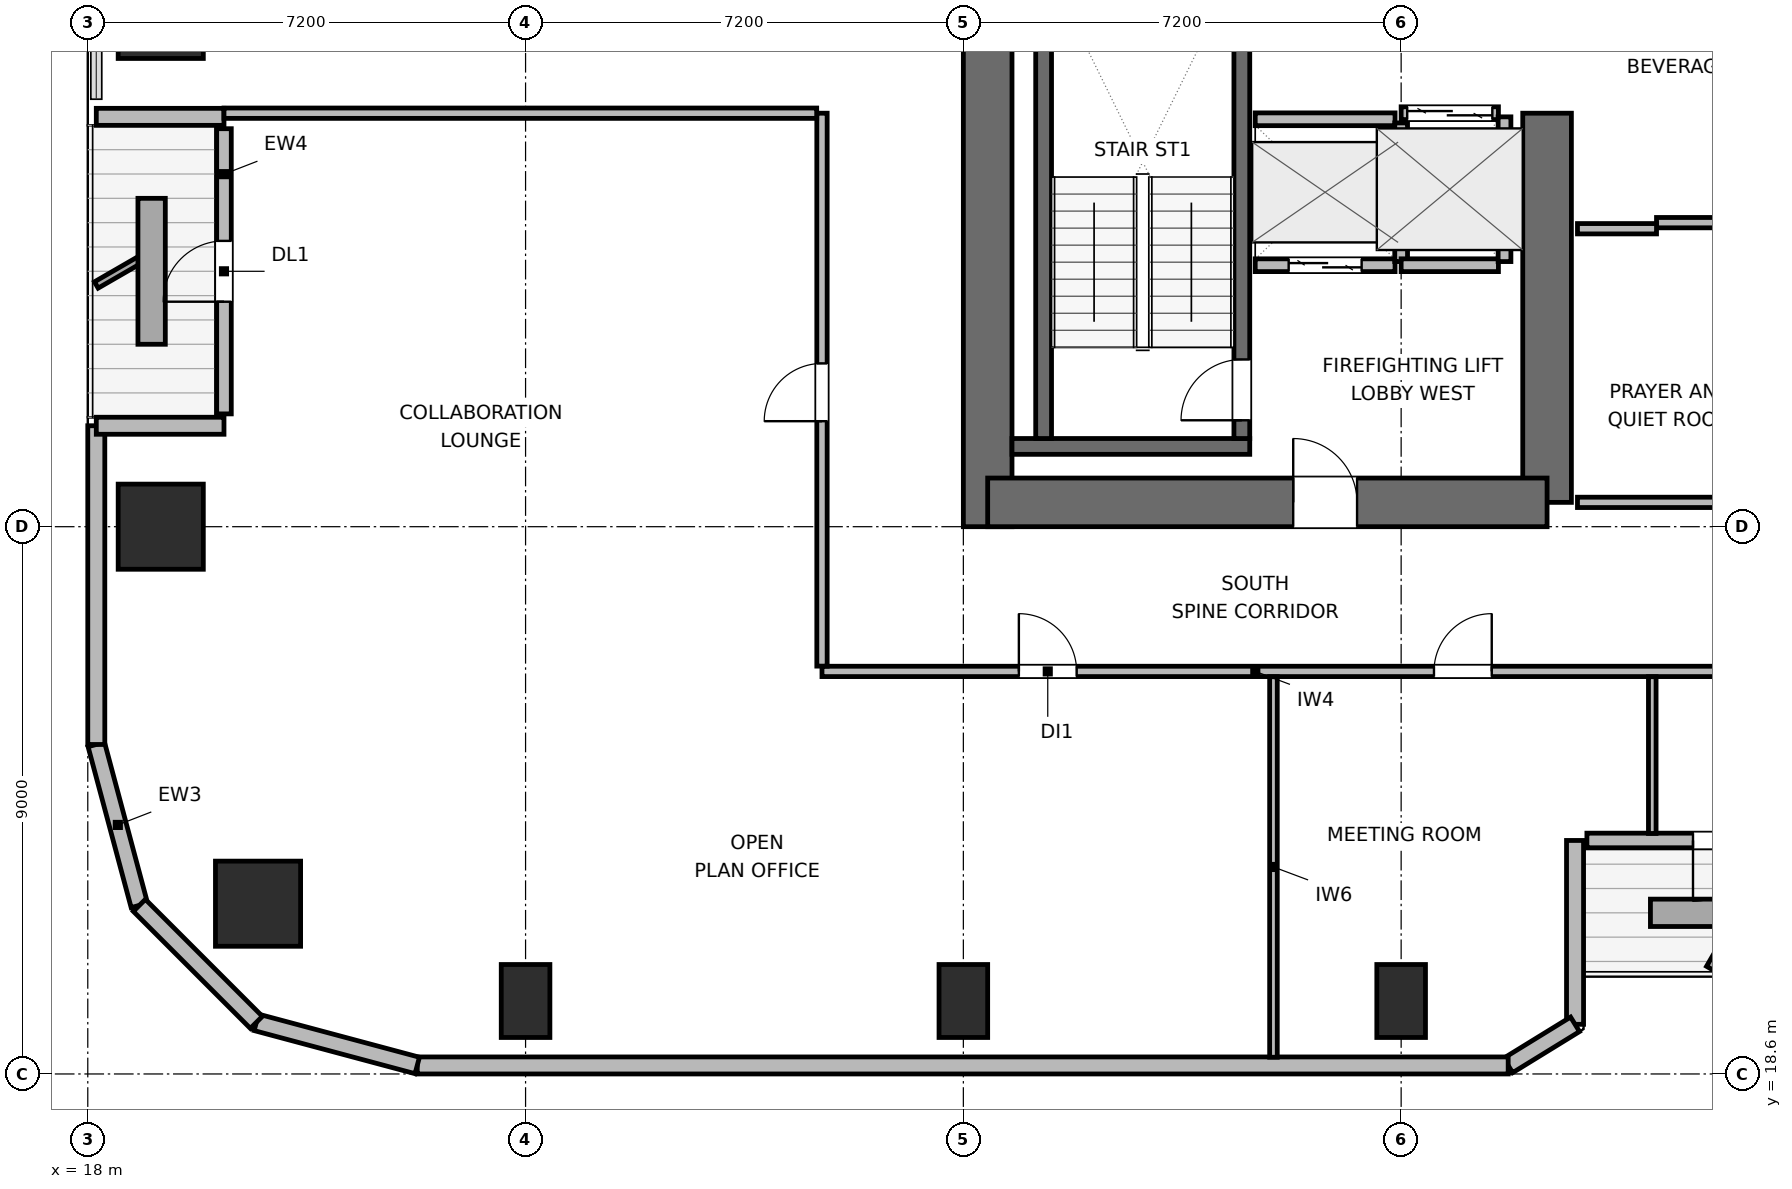
"""IFC4 building model, lengths in metres.
Left out: names, types, materials, properties, quantities, classifications, styles, units other than length and angle.
Written with IfcOpenShell. Run it as: python <this file> out.ifc"""

import sys

from ifc_helpers import new_model, si_unit, direction, frame, frame_2d, origin, origin_2d, place, context, subcontext, project, spatial, rectangle, circle, extrude, element, fill, save


model = new_model("IFC4")
c1 = context("Model", 3, precision=1e-05, world=origin(), true_north=direction((0.0, 1.0)))
c2 = subcontext(c1, "Body", "Model", "MODEL_VIEW")
j1 = project(units=[si_unit("LENGTHUNIT", "METRE"), si_unit("PLANEANGLEUNIT", "RADIAN")], contexts=[c1])
p1 = place(None, origin())
s1 = spatial("IfcSite", under=j1, at=p1, CompositionType="ELEMENT")
p2 = place(p1, origin())
s2 = spatial("IfcBuilding", under=s1, at=p2, CompositionType="ELEMENT")
p3 = place(p2, frame((0.0, 0.0, 154.5)))
s3 = spatial("IfcBuildingStorey", under=s2, at=p3, CompositionType="ELEMENT", Elevation=154.5)
p4 = place(p3, frame((32.8, 27.6, 0.0), z_axis=(0.0, 0.0, 1.0), x_axis=(0.0, 1.0, 0.0)))
e1 = element("IfcWall", 1, at=p4, inside=s3, PredefinedType="SHEAR", context=c2, shape_type="SweptSolid", body=[
    extrude(rectangle(XDim=16.8, YDim=0.8, at=frame_2d((8.4, 0.0))), origin(), (0.0, 0.0, 1.0), 3.9),
])
p5 = place(p3, frame((42.0, 28.0, 0.0), z_axis=(0.0, 0.0, 1.0), x_axis=(0.0, 1.0, 0.0)))
e2 = element("IfcWall", 2, at=p5, inside=s3, PredefinedType="SHEAR", context=c2, shape_type="SweptSolid", body=[
    extrude(rectangle(XDim=6.4, YDim=0.8, at=frame_2d((3.2, 0.0))), origin(), (0.0, 0.0, 1.0), 3.9),
])
p6 = place(p3, frame((32.8, 28.0, 0.0), z_axis=(0.0, 0.0, 1.0), x_axis=(1.0, 0.0, 0.0)))
e3 = element("IfcWall", 3, at=p6, inside=s3, PredefinedType="SHEAR", context=c2, shape_type="SweptSolid", body=[
    extrude(rectangle(XDim=9.2, YDim=0.8, at=frame_2d((4.6, 0.0))), origin(), (0.0, 0.0, 1.0), 3.9),
])
p7 = place(p6, frame((5.025, 0.0, 0.0)))
e4 = element("IfcOpeningElement", 4, at=p7, cuts=e3, PredefinedType="OPENING", context=c2, shape_type="SweptSolid", body=[
    extrude(rectangle(XDim=1.05, YDim=2.04, at=frame_2d((0.525, 1.02))), frame((0.0, 0.41, 0.0), z_axis=(0.0, -1.0, 0.0), x_axis=(1.0, 0.0, 0.0)), (0.0, 0.0, 1.0), 0.82),
])
p8 = place(p3, frame((33.2, 28.92, 0.0), z_axis=(0.0, 0.0, 1.0), x_axis=(1.0, 0.0, 0.0)))
e5 = element("IfcWall", 5, at=p8, inside=s3, PredefinedType="SHEAR", context=c2, shape_type="SweptSolid", body=[
    extrude(rectangle(XDim=3.91, YDim=0.26, at=frame_2d((1.955, 0.0))), origin(), (0.0, 0.0, 1.0), 3.9),
])
p9 = place(p3, frame((33.72, 29.05, 0.0), z_axis=(0.0, 0.0, 1.0), x_axis=(0.0, 1.0, 0.0)))
e6 = element("IfcWall", 6, at=p9, inside=s3, PredefinedType="SHEAR", context=c2, shape_type="SweptSolid", body=[
    extrude(rectangle(XDim=7.6, YDim=0.26, at=frame_2d((3.8, 0.0))), origin(), (0.0, 0.0, 1.0), 3.9),
])
p10 = place(p3, frame((36.98, 29.05, 0.0), z_axis=(0.0, 0.0, 1.0), x_axis=(0.0, 1.0, 0.0)))
e7 = element("IfcWall", 7, at=p10, inside=s3, PredefinedType="SHEAR", context=c2, shape_type="SweptSolid", body=[
    extrude(rectangle(XDim=7.6, YDim=0.26, at=frame_2d((3.8, 0.0))), origin(), (0.0, 0.0, 1.0), 3.9),
])
p11 = place(p10, frame((0.3, 0.0, 0.0)))
e8 = element("IfcOpeningElement", 8, at=p11, cuts=e7, PredefinedType="OPENING", context=c2, shape_type="SweptSolid", body=[
    extrude(rectangle(XDim=1.0, YDim=2.04, at=frame_2d((0.5, 1.02))), frame((0.0, 0.14, 0.0), z_axis=(0.0, -1.0, 0.0), x_axis=(1.0, 0.0, 0.0)), (0.0, 0.0, 1.0), 0.28),
])
p12 = place(p3, frame((20.8, 21.4, 0.0), z_axis=(0.0, 0.0, 1.0), x_axis=(1.0, 0.0, 0.0)))
e9 = element("IfcColumn", 9, at=p12, inside=s3, PredefinedType="COLUMN", context=c2, shape_type="SweptSolid", body=[
    extrude(circle(Radius=0.7, at=origin_2d()), origin(), (0.0, 0.0, 1.0), 3.9),
])
for number, where, z_axis, x_axis in (
    (10, (25.2, 19.8, 0.0), (0.0, 0.0, 1.0), (1.0, 0.0, 0.0)),
    (11, (32.4, 19.8, 0.0), (0.0, 0.0, 1.0), (1.0, 0.0, 0.0)),
    (12, (39.6, 19.8, 0.0), (0.0, 0.0, 1.0), (1.0, 0.0, 0.0)),
):
    element("IfcColumn", number, at=place(p3, frame(where, z_axis=z_axis, x_axis=x_axis)), inside=s3, PredefinedType="COLUMN", context=c2, shape_type="SweptSolid", body=[
        extrude(rectangle(XDim=0.8, YDim=1.2, at=origin_2d()), origin(), (0.0, 0.0, 1.0), 3.9),
    ])
for number, where, z_axis, x_axis in (
    (13, (19.2, 27.6, 0.0), (0.0, 0.0, 1.0), (1.0, 0.0, 0.0)),
    (14, (19.2, 36.0, 0.0), (0.0, 0.0, 1.0), (1.0, 0.0, 0.0)),
):
    element("IfcColumn", number, at=place(p3, frame(where, z_axis=z_axis, x_axis=x_axis)), inside=s3, PredefinedType="COLUMN", context=c2, shape_type="SweptSolid", body=[
        extrude(rectangle(XDim=1.4, YDim=1.4, at=origin_2d()), origin(), (0.0, 0.0, 1.0), 3.9),
    ])
p13 = place(p3, frame((18.848, 21.373, 0.0), z_axis=(0.0, 0.0, 1.0), x_axis=(-0.258672222976, 0.9659651552, 0.0)))
e15 = element("IfcWall", 15, at=p13, inside=s3, PredefinedType="SOLIDWALL", context=c2, shape_type="SweptSolid", body=[
    extrude(rectangle(XDim=2.739, YDim=0.28, at=frame_2d((1.37, 0.0))), origin(), (0.0, 0.0, 1.0), 3.68),
])
p14 = place(p3, frame((18.14, 24.018, 0.0), z_axis=(0.0, 0.0, 1.0), x_axis=(0.0, 1.0, 0.0)))
e16 = element("IfcWall", 16, at=p14, inside=s3, PredefinedType="SOLIDWALL", context=c2, shape_type="SweptSolid", body=[
    extrude(rectangle(XDim=5.242, YDim=0.28, at=frame_2d((2.621, 0.0))), origin(), (0.0, 0.0, 1.0), 3.68),
])
p15 = place(p3, frame((18.14, 29.26, 0.0), z_axis=(0.0, 0.0, 1.0), x_axis=(1.0, 0.0, 0.0)))
e17 = element("IfcWall", 17, at=p15, inside=s3, PredefinedType="SOLIDWALL", context=c2, shape_type="SweptSolid", body=[
    extrude(rectangle(XDim=2.1, YDim=0.28, at=frame_2d((1.05, 0.0))), origin(), (0.0, 0.0, 1.0), 3.116),
])
p16 = place(p3, frame((20.24, 29.455, 0.0), z_axis=(0.0, 0.0, 1.0), x_axis=(0.0, 1.0, 0.0)))
e18 = element("IfcWall", 18, at=p16, inside=s3, PredefinedType="SOLIDWALL", context=c2, shape_type="SweptSolid", body=[
    extrude(rectangle(XDim=4.69, YDim=0.24, at=frame_2d((2.345, 0.0))), origin(), (0.0, 0.0, 1.0), 3.248),
])
p17 = place(p16, frame((1.845, 0.0, 0.0)))
e19 = element("IfcOpeningElement", 19, at=p17, cuts=e18, PredefinedType="OPENING", context=c2, shape_type="SweptSolid", body=[
    extrude(rectangle(XDim=1.0, YDim=2.02, at=frame_2d((0.5, 1.01))), frame((0.0, 0.13, 0.0), z_axis=(0.0, -1.0, 0.0), x_axis=(1.0, 0.0, 0.0)), (0.0, 0.0, 1.0), 0.26),
])
p18 = place(p3, frame((20.24, 34.34, 0.0), z_axis=(0.0, 0.0, 1.0), x_axis=(-1.0, 0.0, 0.0)))
e20 = element("IfcWall", 20, at=p18, inside=s3, PredefinedType="SOLIDWALL", context=c2, shape_type="SweptSolid", body=[
    extrude(rectangle(XDim=2.1, YDim=0.28, at=frame_2d((1.05, 0.0))), origin(), (0.0, 0.0, 1.0), 3.116),
])
p19 = place(p3, frame((47.145, 22.44, 0.0), z_axis=(0.0, 0.0, 1.0), x_axis=(-1.0, 0.0, 0.0)))
e21 = element("IfcWall", 21, at=p19, inside=s3, PredefinedType="SOLIDWALL", context=c2, shape_type="SweptSolid", body=[
    extrude(rectangle(XDim=4.49, YDim=0.24, at=frame_2d((2.245, 0.0))), origin(), (0.0, 0.0, 1.0), 3.68),
])
p20 = place(p19, frame((1.745, 0.0, 0.0)))
e22 = element("IfcOpeningElement", 22, at=p20, cuts=e21, PredefinedType="OPENING", context=c2, shape_type="SweptSolid", body=[
    extrude(rectangle(XDim=1.0, YDim=2.02, at=frame_2d((0.5, 1.01))), frame((0.0, 0.13, 0.0), z_axis=(0.0, -1.0, 0.0), x_axis=(1.0, 0.0, 0.0)), (0.0, 0.0, 1.0), 0.26),
])
p21 = place(p3, frame((42.46, 22.44, 0.0), z_axis=(0.0, 0.0, 1.0), x_axis=(0.0, -1.0, 0.0)))
e23 = element("IfcWall", 23, at=p21, inside=s3, PredefinedType="SOLIDWALL", context=c2, shape_type="SweptSolid", body=[
    extrude(rectangle(XDim=3.024, YDim=0.28, at=frame_2d((1.512, 0.0))), origin(), (0.0, 0.0, 1.0), 2.265),
])
p22 = place(p3, frame((42.46, 19.416, 0.0), z_axis=(0.0, 0.0, 1.0), x_axis=(-0.851801140441, -0.523865266212, 0.0)))
e24 = element("IfcWall", 24, at=p22, inside=s3, PredefinedType="SOLIDWALL", context=c2, shape_type="SweptSolid", body=[
    extrude(rectangle(XDim=1.291, YDim=0.28, at=frame_2d((0.646, 0.0))), origin(), (0.0, 0.0, 1.0), 3.68),
])
p23 = place(p3, frame((41.36, 18.74, 0.0), z_axis=(0.0, 0.0, 1.0), x_axis=(-1.0, 0.0, 0.0)))
e25 = element("IfcWall", 25, at=p23, inside=s3, PredefinedType="SOLIDWALL", context=c2, shape_type="SweptSolid", body=[
    extrude(rectangle(XDim=17.942, YDim=0.28, at=frame_2d((8.971, 0.0))), origin(), (0.0, 0.0, 1.0), 3.68),
])
p24 = place(p3, frame((23.418, 18.74, 0.0), z_axis=(0.0, 0.0, 1.0), x_axis=(-0.965971118627, 0.258649952598, 0.0)))
e26 = element("IfcWall", 26, at=p24, inside=s3, PredefinedType="SOLIDWALL", context=c2, shape_type="SweptSolid", body=[
    extrude(rectangle(XDim=2.739, YDim=0.28, at=frame_2d((1.37, 0.0))), origin(), (0.0, 0.0, 1.0), 3.68),
])
p25 = place(p3, frame((20.772, 19.448, 0.0), z_axis=(0.0, 0.0, 1.0), x_axis=(-0.707106781187, 0.707106781187, 0.0)))
e27 = element("IfcWall", 27, at=p25, inside=s3, PredefinedType="SOLIDWALL", context=c2, shape_type="SweptSolid", body=[
    extrude(rectangle(XDim=2.721, YDim=0.28, at=frame_2d((1.36, 0.0))), origin(), (0.0, 0.0, 1.0), 3.68),
])
p26 = place(p3, frame((37.2, 31.9, 0.0), z_axis=(0.0, 0.0, 1.0), x_axis=(1.0, 0.0, 0.0)))
e28 = element("IfcWall", 28, at=p26, inside=s3, PredefinedType="PARTITIONING", context=c2, shape_type="SweptSolid", body=[
    extrude(rectangle(XDim=2.3, YDim=0.21, at=frame_2d((1.15, 0.0))), origin(), (0.0, 0.0, 1.0), 3.68),
])
p27 = place(p26, frame((0.55, 0.0, 0.0)))
e29 = element("IfcOpeningElement", 29, at=p27, cuts=e28, PredefinedType="OPENING", context=c2, shape_type="SweptSolid", body=[
    extrude(rectangle(XDim=1.2, YDim=2.04, at=frame_2d((0.6, 1.02))), frame((0.0, 0.115, 0.0), z_axis=(0.0, -1.0, 0.0), x_axis=(1.0, 0.0, 0.0)), (0.0, 0.0, 1.0), 0.23),
])
p28 = place(p3, frame((37.2, 34.3, 0.0), z_axis=(0.0, 0.0, 1.0), x_axis=(1.0, 0.0, 0.0)))
e30 = element("IfcWall", 30, at=p28, inside=s3, PredefinedType="PARTITIONING", context=c2, shape_type="SweptSolid", body=[
    extrude(rectangle(XDim=2.3, YDim=0.21, at=frame_2d((1.15, 0.0))), origin(), (0.0, 0.0, 1.0), 3.68),
])
p29 = place(p3, frame((39.6, 31.96, 0.0), z_axis=(0.0, 0.0, 1.0), x_axis=(0.0, 1.0, 0.0)))
e31 = element("IfcWall", 31, at=p29, inside=s3, PredefinedType="PARTITIONING", context=c2, shape_type="SweptSolid", body=[
    extrude(rectangle(XDim=2.28, YDim=0.21, at=frame_2d((1.14, 0.0))), origin(), (0.0, 0.0, 1.0), 3.68),
])
p30 = place(p3, frame((39.6, 34.4, 0.0), z_axis=(0.0, 0.0, 1.0), x_axis=(1.0, 0.0, 0.0)))
e32 = element("IfcWall", 32, at=p30, inside=s3, PredefinedType="PARTITIONING", context=c2, shape_type="SweptSolid", body=[
    extrude(rectangle(XDim=1.6, YDim=0.21, at=frame_2d((0.8, 0.0))), origin(), (0.0, 0.0, 1.0), 3.68),
])
p31 = place(p30, frame((0.1, 0.0, 0.0)))
e33 = element("IfcOpeningElement", 33, at=p31, cuts=e32, PredefinedType="OPENING", context=c2, shape_type="SweptSolid", body=[
    extrude(rectangle(XDim=1.4, YDim=2.06, at=frame_2d((0.7, 1.03))), frame((0.0, 0.115, 0.0), z_axis=(0.0, -1.0, 0.0), x_axis=(1.0, 0.0, 0.0)), (0.0, 0.0, 1.0), 0.23),
])
p32 = place(p3, frame((39.6, 31.9, 0.0), z_axis=(0.0, 0.0, 1.0), x_axis=(1.0, 0.0, 0.0)))
e34 = element("IfcWall", 34, at=p32, inside=s3, PredefinedType="PARTITIONING", context=c2, shape_type="SweptSolid", body=[
    extrude(rectangle(XDim=1.6, YDim=0.21, at=frame_2d((0.8, 0.0))), origin(), (0.0, 0.0, 1.0), 3.68),
])
p33 = place(p3, frame((41.3, 31.96, 0.0), z_axis=(0.0, 0.0, 1.0), x_axis=(0.0, 1.0, 0.0)))
e35 = element("IfcWall", 35, at=p33, inside=s3, PredefinedType="PARTITIONING", context=c2, shape_type="SweptSolid", body=[
    extrude(rectangle(XDim=2.38, YDim=0.21, at=frame_2d((1.19, 0.0))), origin(), (0.0, 0.0, 1.0), 3.68),
])
p34 = place(p3, frame((43.8, 32.6, 0.0), z_axis=(0.0, 0.0, 1.0), x_axis=(1.0, 0.0, 0.0)))
e36 = element("IfcWall", 36, at=p34, inside=s3, PredefinedType="PARTITIONING", context=c2, shape_type="SweptSolid", body=[
    extrude(rectangle(XDim=2.913, YDim=0.17, at=frame_2d((1.457, 0.0))), origin(), (0.0, 0.0, 1.0), 3.68),
])
p35 = place(p3, frame((42.5, 28.0, 0.0), z_axis=(0.0, 0.0, 1.0), x_axis=(1.0, 0.0, 0.0)))
e37 = element("IfcWall", 37, at=p35, inside=s3, PredefinedType="PARTITIONING", context=c2, shape_type="SweptSolid", body=[
    extrude(rectangle(XDim=4.213, YDim=0.17, at=frame_2d((2.106, 0.0))), origin(), (0.0, 0.0, 1.0), 2.565),
])
p36 = place(p3, frame((42.5, 32.5, 0.0), z_axis=(0.0, 0.0, 1.0), x_axis=(1.0, 0.0, 0.0)))
e38 = element("IfcWall", 38, at=p36, inside=s3, PredefinedType="PARTITIONING", context=c2, shape_type="SweptSolid", body=[
    extrude(rectangle(XDim=1.3, YDim=0.17, at=frame_2d((0.65, 0.0))), origin(), (0.0, 0.0, 1.0), 3.68),
])
p37 = place(p3, frame((30.075, 25.22, 0.0), z_axis=(0.0, 0.0, 1.0), x_axis=(1.0, 0.0, 0.0)))
e39 = element("IfcWall", 39, at=p37, inside=s3, PredefinedType="PARTITIONING", context=c2, shape_type="SweptSolid", body=[
    extrude(rectangle(XDim=33.525, YDim=0.17, at=frame_2d((16.763, 0.0))), origin(), (0.0, 0.0, 1.0), 3.68),
])
p38 = place(p37, frame((3.238, 0.0, 0.0)))
e40 = element("IfcOpeningElement", 40, at=p38, cuts=e39, PredefinedType="OPENING", context=c2, shape_type="SweptSolid", body=[
    extrude(rectangle(XDim=0.95, YDim=2.04, at=frame_2d((0.475, 1.02))), frame((0.0, 0.095, 0.0), z_axis=(0.0, -1.0, 0.0), x_axis=(1.0, 0.0, 0.0)), (0.0, 0.0, 1.0), 0.19),
])
p39 = place(p37, frame((10.065, 0.0, 0.0)))
e41 = element("IfcOpeningElement", 41, at=p39, cuts=e39, PredefinedType="OPENING", context=c2, shape_type="SweptSolid", body=[
    extrude(rectangle(XDim=0.95, YDim=2.04, at=frame_2d((0.475, 1.02))), frame((0.0, 0.095, 0.0), z_axis=(0.0, -1.0, 0.0), x_axis=(1.0, 0.0, 0.0)), (0.0, 0.0, 1.0), 0.19),
])
p40 = place(p37, frame((16.29, 0.0, 0.0)))
e42 = element("IfcOpeningElement", 42, at=p40, cuts=e39, PredefinedType="OPENING", context=c2, shape_type="SweptSolid", body=[
    extrude(rectangle(XDim=0.95, YDim=2.04, at=frame_2d((0.475, 1.02))), frame((0.0, 0.095, 0.0), z_axis=(0.0, -1.0, 0.0), x_axis=(1.0, 0.0, 0.0)), (0.0, 0.0, 1.0), 0.19),
])
p41 = place(p37, frame((22.51, 0.0, 0.0)))
e43 = element("IfcOpeningElement", 43, at=p41, cuts=e39, PredefinedType="OPENING", context=c2, shape_type="SweptSolid", body=[
    extrude(rectangle(XDim=0.95, YDim=2.04, at=frame_2d((0.475, 1.02))), frame((0.0, 0.095, 0.0), z_axis=(0.0, -1.0, 0.0), x_axis=(1.0, 0.0, 0.0)), (0.0, 0.0, 1.0), 0.19),
])
p42 = place(p37, frame((29.335, 0.0, 0.0)))
e44 = element("IfcOpeningElement", 44, at=p42, cuts=e39, PredefinedType="OPENING", context=c2, shape_type="SweptSolid", body=[
    extrude(rectangle(XDim=0.95, YDim=2.04, at=frame_2d((0.475, 1.02))), frame((0.0, 0.095, 0.0), z_axis=(0.0, -1.0, 0.0), x_axis=(1.0, 0.0, 0.0)), (0.0, 0.0, 1.0), 0.19),
])
p43 = place(p3, frame((30.075, 25.307, 0.0), z_axis=(0.0, 0.0, 1.0), x_axis=(0.0, 1.0, 0.0)))
e45 = element("IfcWall", 45, at=p43, inside=s3, PredefinedType="PARTITIONING", context=c2, shape_type="SweptSolid", body=[
    extrude(rectangle(XDim=9.093, YDim=0.17, at=frame_2d((4.546, 0.0))), origin(), (0.0, 0.0, 1.0), 3.68),
])
p44 = place(p43, frame((4.028, 0.0, 0.0)))
e46 = element("IfcOpeningElement", 46, at=p44, cuts=e45, PredefinedType="OPENING", context=c2, shape_type="SweptSolid", body=[
    extrude(rectangle(XDim=0.95, YDim=2.04, at=frame_2d((0.475, 1.02))), frame((0.0, 0.095, 0.0), z_axis=(0.0, -1.0, 0.0), x_axis=(1.0, 0.0, 0.0)), (0.0, 0.0, 1.0), 0.19),
])
p45 = place(p3, frame((37.5, 18.875, 0.0), z_axis=(0.0, 0.0, 1.0), x_axis=(0.0, 1.0, 0.0)))
e47 = element("IfcWall", 47, at=p45, inside=s3, PredefinedType="PARTITIONING", context=c2, shape_type="SweptSolid", body=[
    extrude(rectangle(XDim=6.258, YDim=0.125, at=frame_2d((3.129, 0.0))), origin(), (0.0, 0.0, 1.0), 3.68),
])
p46 = place(p3, frame((43.73, 22.555, 0.0), z_axis=(0.0, 0.0, 1.0), x_axis=(0.0, 1.0, 0.0)))
e48 = element("IfcWall", 48, at=p46, inside=s3, PredefinedType="PARTITIONING", context=c2, shape_type="SweptSolid", body=[
    extrude(rectangle(XDim=2.578, YDim=0.125, at=frame_2d((1.289, 0.0))), origin(), (0.0, 0.0, 1.0), 3.043),
])
p47 = place(p3, frame((20.24, 34.4, 0.0), z_axis=(0.0, 0.0, 1.0), x_axis=(1.0, 0.0, 0.0)))
e49 = element("IfcWall", 49, at=p47, inside=s3, PredefinedType="PARTITIONING", context=c2, shape_type="SweptSolid", body=[
    extrude(rectangle(XDim=9.748, YDim=0.17, at=frame_2d((4.874, 0.0))), origin(), (0.0, 0.0, 1.0), 3.68),
])
p48 = place(p17, origin())
e50 = element("IfcDoor", 50, at=p48, inside=s3, OperationType="SINGLE_SWING_LEFT", PredefinedType="DOOR", context=c2, shape_type="SweptSolid", body=[
    extrude(rectangle(XDim=1.0, YDim=2.02, at=frame_2d((0.5, 1.01))), frame((0.0, 0.025, 0.0), z_axis=(0.0, -1.0, 0.0), x_axis=(1.0, 0.0, 0.0)), (0.0, 0.0, 1.0), 0.05),
])
fill(e19, e50)
p49 = place(p20, origin())
e51 = element("IfcDoor", 51, at=p49, inside=s3, OperationType="SINGLE_SWING_RIGHT", PredefinedType="DOOR", context=c2, shape_type="SweptSolid", body=[
    extrude(rectangle(XDim=1.0, YDim=2.02, at=frame_2d((0.5, 1.01))), frame((0.0, 0.025, 0.0), z_axis=(0.0, -1.0, 0.0), x_axis=(1.0, 0.0, 0.0)), (0.0, 0.0, 1.0), 0.05),
])
fill(e22, e51)
p50 = place(p11, origin())
e52 = element("IfcDoor", 52, at=p50, inside=s3, OperationType="SINGLE_SWING_LEFT", PredefinedType="DOOR", context=c2, shape_type="SweptSolid", body=[
    extrude(rectangle(XDim=1.0, YDim=2.04, at=frame_2d((0.5, 1.02))), frame((0.0, 0.025, 0.0), z_axis=(0.0, -1.0, 0.0), x_axis=(1.0, 0.0, 0.0)), (0.0, 0.0, 1.0), 0.05),
])
fill(e8, e52)
p51 = place(p27, origin())
e53 = element("IfcDoor", 53, at=p51, inside=s3, OperationType="DOUBLE_DOOR_SLIDING", PredefinedType="DOOR", context=c2, shape_type="SweptSolid", body=[
    extrude(rectangle(XDim=1.2, YDim=2.04, at=frame_2d((0.6, 1.02))), frame((0.0, 0.025, 0.0), z_axis=(0.0, -1.0, 0.0), x_axis=(1.0, 0.0, 0.0)), (0.0, 0.0, 1.0), 0.05),
])
fill(e29, e53)
p52 = place(p31, origin())
e54 = element("IfcDoor", 54, at=p52, inside=s3, OperationType="DOUBLE_DOOR_SLIDING", PredefinedType="DOOR", context=c2, shape_type="SweptSolid", body=[
    extrude(rectangle(XDim=1.4, YDim=2.06, at=frame_2d((0.7, 1.03))), frame((0.0, 0.025, 0.0), z_axis=(0.0, -1.0, 0.0), x_axis=(1.0, 0.0, 0.0)), (0.0, 0.0, 1.0), 0.05),
])
fill(e33, e54)
p53 = place(p7, origin())
e55 = element("IfcDoor", 55, at=p53, inside=s3, OperationType="SINGLE_SWING_LEFT", PredefinedType="DOOR", context=c2, shape_type="SweptSolid", body=[
    extrude(rectangle(XDim=1.05, YDim=2.04, at=frame_2d((0.525, 1.02))), frame((0.0, 0.025, 0.0), z_axis=(0.0, -1.0, 0.0), x_axis=(1.0, 0.0, 0.0)), (0.0, 0.0, 1.0), 0.05),
])
fill(e4, e55)
p54 = place(p38, origin())
e56 = element("IfcDoor", 56, at=p54, inside=s3, OperationType="SINGLE_SWING_LEFT", PredefinedType="DOOR", context=c2, shape_type="SweptSolid", body=[
    extrude(rectangle(XDim=0.95, YDim=2.04, at=frame_2d((0.475, 1.02))), frame((0.0, 0.025, 0.0), z_axis=(0.0, -1.0, 0.0), x_axis=(1.0, 0.0, 0.0)), (0.0, 0.0, 1.0), 0.05),
])
fill(e40, e56)
p55 = place(p39, origin())
e57 = element("IfcDoor", 57, at=p55, inside=s3, OperationType="SINGLE_SWING_RIGHT", PredefinedType="DOOR", context=c2, shape_type="SweptSolid", body=[
    extrude(rectangle(XDim=0.95, YDim=2.04, at=frame_2d((0.475, 1.02))), frame((0.0, 0.025, 0.0), z_axis=(0.0, -1.0, 0.0), x_axis=(1.0, 0.0, 0.0)), (0.0, 0.0, 1.0), 0.05),
])
fill(e41, e57)
p56 = place(p44, origin())
e58 = element("IfcDoor", 58, at=p56, inside=s3, OperationType="SINGLE_SWING_LEFT", PredefinedType="DOOR", context=c2, shape_type="SweptSolid", body=[
    extrude(rectangle(XDim=0.95, YDim=2.04, at=frame_2d((0.475, 1.02))), frame((0.0, 0.025, 0.0), z_axis=(0.0, -1.0, 0.0), x_axis=(1.0, 0.0, 0.0)), (0.0, 0.0, 1.0), 0.05),
])
fill(e46, e58)
save(model, sys.argv[1])
